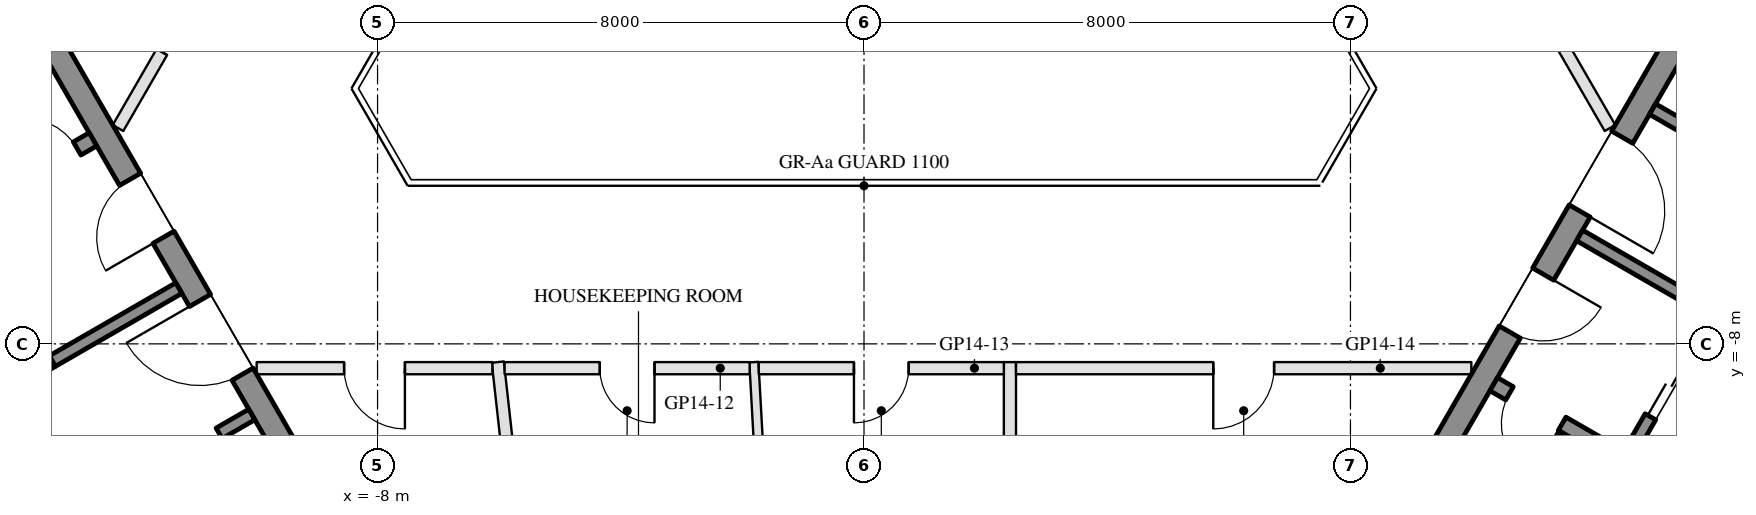
"""IFC4 building model, lengths in metres.
Left out: names, types, materials, properties, quantities, classifications, styles, units other than length and angle.
Written with IfcOpenShell. Run it as: python <this file> out.ifc"""

import sys

from ifc_helpers import new_model, si_unit, direction, frame, frame_2d, origin, place, context, subcontext, project, spatial, rectangle, extrude, element, fill, save


model = new_model("IFC4")
c1 = context("Model", 3, precision=1e-05, world=origin(), true_north=direction((0.0, 1.0)))
c2 = subcontext(c1, "Body", "Model", "MODEL_VIEW")
j1 = project(units=[si_unit("LENGTHUNIT", "METRE"), si_unit("PLANEANGLEUNIT", "RADIAN")], contexts=[c1])
p1 = place(None, origin())
s1 = spatial("IfcSite", under=j1, at=p1, CompositionType="ELEMENT")
p2 = place(p1, origin())
s2 = spatial("IfcBuilding", under=s1, at=p2, CompositionType="ELEMENT")
p3 = place(p2, frame((0.0, 0.0, 161.4)))
s3 = spatial("IfcBuildingStorey", under=s2, at=p3, CompositionType="ELEMENT", Elevation=161.4)
p4 = place(p3, frame((-13.845, -2.22, 0.0), z_axis=(0.0, 0.0, 1.0), x_axis=(0.500004234368, -0.866022959057, 0.0)))
e1 = element("IfcWall", 1, at=p4, inside=s3, PredefinedType="SHEAR", context=c2, shape_type="SweptSolid", body=[
    extrude(rectangle(XDim=10.0, YDim=0.4, at=frame_2d((5.0, 0.0))), origin(), (0.0, 0.0, 1.0), 3.5),
])
p5 = place(p4, frame((3.55, 0.0, 0.0)))
e2 = element("IfcOpeningElement", 2, at=p5, cuts=e1, PredefinedType="OPENING", context=c2, shape_type="SweptSolid", body=[
    extrude(rectangle(XDim=1.1, YDim=2.1, at=frame_2d((0.55, 1.05))), frame((0.0, 0.21, 0.0), z_axis=(0.0, -1.0, 0.0), x_axis=(1.0, 0.0, 0.0)), (0.0, 0.0, 1.0), 0.42),
])
p6 = place(p4, frame((5.85, 0.0, 0.0)))
e3 = element("IfcOpeningElement", 3, at=p6, cuts=e1, PredefinedType="OPENING", context=c2, shape_type="SweptSolid", body=[
    extrude(rectangle(XDim=1.4, YDim=2.1, at=frame_2d((0.7, 1.05))), frame((0.0, 0.21, 0.0), z_axis=(0.0, -1.0, 0.0), x_axis=(1.0, 0.0, 0.0)), (0.0, 0.0, 1.0), 0.42),
])
p7 = place(p3, frame((-12.681, -4.636, 0.0), z_axis=(0.0, 0.0, 1.0), x_axis=(-0.866021702275, -0.500006411147, 0.0)))
e4 = element("IfcWall", 4, at=p7, inside=s3, PredefinedType="SHEAR", context=c2, shape_type="SweptSolid", body=[
    extrude(rectangle(XDim=6.45, YDim=0.25, at=frame_2d((3.225, 0.0))), origin(), (0.0, 0.0, 1.0), 3.5),
])
p8 = place(p7, frame((0.3, 0.0, 0.0)))
e5 = element("IfcOpeningElement", 5, at=p8, cuts=e4, PredefinedType="OPENING", context=c2, shape_type="SweptSolid", body=[
    extrude(rectangle(XDim=1.0, YDim=2.1, at=frame_2d((0.5, 1.05))), frame((0.0, 0.135, 0.0), z_axis=(0.0, -1.0, 0.0), x_axis=(1.0, 0.0, 0.0)), (0.0, 0.0, 1.0), 0.27),
])
p9 = place(p3, frame((-14.783, -5.995, 0.0), z_axis=(0.0, 0.0, 1.0), x_axis=(0.49994636267, -0.866056369097, 0.0)))
e6 = element("IfcWall", 6, at=p9, inside=s3, PredefinedType="SHEAR", context=c2, shape_type="SweptSolid", body=[
    extrude(rectangle(XDim=2.8, YDim=0.2, at=frame_2d((1.4, 0.0))), origin(), (0.0, 0.0, 1.0), 3.5),
])
p10 = place(p9, frame((0.7, 0.0, 0.0)))
e7 = element("IfcOpeningElement", 7, at=p10, cuts=e6, PredefinedType="OPENING", context=c2, shape_type="SweptSolid", body=[
    extrude(rectangle(XDim=1.2, YDim=2.1, at=frame_2d((0.6, 1.05))), frame((0.0, 0.11, 0.0), z_axis=(0.0, -1.0, 0.0), x_axis=(1.0, 0.0, 0.0)), (0.0, 0.0, 1.0), 0.22),
])
p11 = place(p3, frame((-11.268, -7.083, 0.0), z_axis=(0.0, 0.0, 1.0), x_axis=(-0.866050077142, -0.499957262057, 0.0)))
e8 = element("IfcWall", 8, at=p11, inside=s3, PredefinedType="SHEAR", context=c2, shape_type="SweptSolid", body=[
    extrude(rectangle(XDim=2.4, YDim=0.2, at=frame_2d((1.2, 0.0))), origin(), (0.0, 0.0, 1.0), 3.5),
])
p12 = place(p3, frame((-10.068, -9.162, 0.0), z_axis=(0.0, 0.0, 1.0), x_axis=(-0.866032725843, -0.499987317609, 0.0)))
e9 = element("IfcWall", 9, at=p12, inside=s3, PredefinedType="SHEAR", context=c2, shape_type="SweptSolid", body=[
    extrude(rectangle(XDim=10.16, YDim=0.2, at=frame_2d((5.08, 0.0))), origin(), (0.0, 0.0, 1.0), 3.5),
])
p13 = place(p12, frame((0.62, 0.0, 0.0)))
e10 = element("IfcOpeningElement", 10, at=p13, cuts=e9, PredefinedType="OPENING", context=c2, shape_type="SweptSolid", body=[
    extrude(rectangle(XDim=1.1, YDim=2.1, at=frame_2d((0.55, 1.05))), frame((0.0, 0.11, 0.0), z_axis=(0.0, -1.0, 0.0), x_axis=(1.0, 0.0, 0.0)), (0.0, 0.0, 1.0), 0.22),
])
p14 = place(p12, frame((3.16, 0.0, 0.0)))
e11 = element("IfcOpeningElement", 11, at=p14, cuts=e9, PredefinedType="OPENING", context=c2, shape_type="SweptSolid", body=[
    extrude(rectangle(XDim=1.1, YDim=2.1, at=frame_2d((0.55, 1.05))), frame((0.0, 0.11, 0.0), z_axis=(0.0, -1.0, 0.0), x_axis=(1.0, 0.0, 0.0)), (0.0, 0.0, 1.0), 0.22),
])
p15 = place(p12, frame((5.7, 0.0, 0.0)))
e12 = element("IfcOpeningElement", 12, at=p15, cuts=e9, PredefinedType="OPENING", context=c2, shape_type="SweptSolid", body=[
    extrude(rectangle(XDim=1.1, YDim=2.1, at=frame_2d((0.55, 1.05))), frame((0.0, 0.11, 0.0), z_axis=(0.0, -1.0, 0.0), x_axis=(1.0, 0.0, 0.0)), (0.0, 0.0, 1.0), 0.22),
])
p16 = place(p12, frame((8.24, 0.0, 0.0)))
e13 = element("IfcOpeningElement", 13, at=p16, cuts=e9, PredefinedType="OPENING", context=c2, shape_type="SweptSolid", body=[
    extrude(rectangle(XDim=1.1, YDim=2.1, at=frame_2d((0.55, 1.05))), frame((0.0, 0.11, 0.0), z_axis=(0.0, -1.0, 0.0), x_axis=(1.0, 0.0, 0.0)), (0.0, 0.0, 1.0), 0.22),
])
p17 = place(p3, frame((8.845, -10.88, 0.0), z_axis=(0.0, 0.0, 1.0), x_axis=(0.500004234368, 0.866022959057, 0.0)))
e14 = element("IfcWall", 14, at=p17, inside=s3, PredefinedType="SHEAR", context=c2, shape_type="SweptSolid", body=[
    extrude(rectangle(XDim=10.0, YDim=0.4, at=frame_2d((5.0, 0.0))), origin(), (0.0, 0.0, 1.0), 3.5),
])
p18 = place(p17, frame((3.55, 0.0, 0.0)))
e15 = element("IfcOpeningElement", 15, at=p18, cuts=e14, PredefinedType="OPENING", context=c2, shape_type="SweptSolid", body=[
    extrude(rectangle(XDim=1.1, YDim=2.1, at=frame_2d((0.55, 1.05))), frame((0.0, 0.21, 0.0), z_axis=(0.0, -1.0, 0.0), x_axis=(1.0, 0.0, 0.0)), (0.0, 0.0, 1.0), 0.42),
])
p19 = place(p17, frame((5.85, 0.0, 0.0)))
e16 = element("IfcOpeningElement", 16, at=p19, cuts=e14, PredefinedType="OPENING", context=c2, shape_type="SweptSolid", body=[
    extrude(rectangle(XDim=1.4, YDim=2.1, at=frame_2d((0.7, 1.05))), frame((0.0, 0.21, 0.0), z_axis=(0.0, -1.0, 0.0), x_axis=(1.0, 0.0, 0.0)), (0.0, 0.0, 1.0), 0.42),
])
p20 = place(p3, frame((10.356, -8.664, 0.0), z_axis=(0.0, 0.0, 1.0), x_axis=(0.866028629588, -0.499994412703, 0.0)))
e17 = element("IfcWall", 17, at=p20, inside=s3, PredefinedType="SHEAR", context=c2, shape_type="SweptSolid", body=[
    extrude(rectangle(XDim=6.45, YDim=0.25, at=frame_2d((3.225, 0.0))), origin(), (0.0, 0.0, 1.0), 3.5),
])
p21 = place(p20, frame((0.3, 0.0, 0.0)))
e18 = element("IfcOpeningElement", 18, at=p21, cuts=e17, PredefinedType="OPENING", context=c2, shape_type="SweptSolid", body=[
    extrude(rectangle(XDim=1.0, YDim=2.1, at=frame_2d((0.5, 1.05))), frame((0.0, 0.135, 0.0), z_axis=(0.0, -1.0, 0.0), x_axis=(1.0, 0.0, 0.0)), (0.0, 0.0, 1.0), 0.27),
])
p22 = place(p3, frame((12.583, -9.805, 0.0), z_axis=(0.0, 0.0, 1.0), x_axis=(0.49994636267, 0.866056369097, 0.0)))
e19 = element("IfcWall", 19, at=p22, inside=s3, PredefinedType="SHEAR", context=c2, shape_type="SweptSolid", body=[
    extrude(rectangle(XDim=2.8, YDim=0.2, at=frame_2d((1.4, 0.0))), origin(), (0.0, 0.0, 1.0), 3.5),
])
p23 = place(p22, frame((0.7, 0.0, 0.0)))
e20 = element("IfcOpeningElement", 20, at=p23, cuts=e19, PredefinedType="OPENING", context=c2, shape_type="SweptSolid", body=[
    extrude(rectangle(XDim=1.2, YDim=2.1, at=frame_2d((0.6, 1.05))), frame((0.0, 0.11, 0.0), z_axis=(0.0, -1.0, 0.0), x_axis=(1.0, 0.0, 0.0)), (0.0, 0.0, 1.0), 0.22),
])
p24 = place(p3, frame((11.768, -6.217, 0.0), z_axis=(0.0, 0.0, 1.0), x_axis=(0.866050077142, -0.499957262057, 0.0)))
e21 = element("IfcWall", 21, at=p24, inside=s3, PredefinedType="SHEAR", context=c2, shape_type="SweptSolid", body=[
    extrude(rectangle(XDim=2.4, YDim=0.2, at=frame_2d((1.2, 0.0))), origin(), (0.0, 0.0, 1.0), 3.5),
])
p25 = place(p3, frame((12.968, -4.138, 0.0), z_axis=(0.0, 0.0, 1.0), x_axis=(0.866028328073, -0.49999493495, 0.0)))
e22 = element("IfcWall", 22, at=p25, inside=s3, PredefinedType="SHEAR", context=c2, shape_type="SweptSolid", body=[
    extrude(rectangle(XDim=10.16, YDim=0.2, at=frame_2d((5.08, 0.0))), origin(), (0.0, 0.0, 1.0), 3.5),
])
p26 = place(p25, frame((0.72, 0.0, 0.0)))
e23 = element("IfcOpeningElement", 23, at=p26, cuts=e22, PredefinedType="OPENING", context=c2, shape_type="SweptSolid", body=[
    extrude(rectangle(XDim=0.9, YDim=2.1, at=frame_2d((0.45, 1.05))), frame((0.0, 0.11, 0.0), z_axis=(0.0, -1.0, 0.0), x_axis=(1.0, 0.0, 0.0)), (0.0, 0.0, 1.0), 0.22),
])
p27 = place(p25, frame((5.8, 0.0, 0.0)))
e24 = element("IfcOpeningElement", 24, at=p27, cuts=e22, PredefinedType="OPENING", context=c2, shape_type="SweptSolid", body=[
    extrude(rectangle(XDim=0.9, YDim=2.1, at=frame_2d((0.45, 1.05))), frame((0.0, 0.11, 0.0), z_axis=(0.0, -1.0, 0.0), x_axis=(1.0, 0.0, 0.0)), (0.0, 0.0, 1.0), 0.22),
])
p28 = place(p3, frame((-4.9, -18.38, 0.0), z_axis=(0.0, 0.0, 1.0), x_axis=(-0.110634961609, 0.993861109648, 0.0)))
e25 = element("IfcWall", 25, at=p28, inside=s3, PredefinedType="PARTITIONING", context=c2, shape_type="SweptSolid", body=[
    extrude(rectangle(XDim=10.142, YDim=0.2, at=frame_2d((5.071, 0.0))), origin(), (0.0, 0.0, 1.0), 3.06),
])
p29 = place(p3, frame((2.4, -19.28, 0.0), z_axis=(0.0, 0.0, 1.0), x_axis=(0.0, 1.0, 0.0)))
e26 = element("IfcWall", 26, at=p29, inside=s3, PredefinedType="PARTITIONING", context=c2, shape_type="SweptSolid", body=[
    extrude(rectangle(XDim=10.98, YDim=0.2, at=frame_2d((5.49, 0.0))), origin(), (0.0, 0.0, 1.0), 3.06),
])
p30 = place(p3, frame((-6.112, -8.4, 0.0), z_axis=(0.0, 0.0, 1.0), x_axis=(-1.0, 0.0, 0.0)))
e27 = element("IfcWall", 27, at=p30, inside=s3, PredefinedType="PARTITIONING", context=c2, shape_type="SweptSolid", body=[
    extrude(rectangle(XDim=3.876, YDim=0.2, at=frame_2d((1.938, 0.0))), origin(), (0.0, 0.0, 1.0), 2.95),
])
p31 = place(p30, frame((1.438, 0.0, 0.0)))
e28 = element("IfcOpeningElement", 28, at=p31, cuts=e27, PredefinedType="OPENING", context=c2, shape_type="SweptSolid", body=[
    extrude(rectangle(XDim=1.0, YDim=2.1, at=frame_2d((0.5, 1.05))), frame((0.0, 0.11, 0.0), z_axis=(0.0, -1.0, 0.0), x_axis=(1.0, 0.0, 0.0)), (0.0, 0.0, 1.0), 0.22),
])
p32 = place(p3, frame((-1.25, -18.38, 0.0), z_axis=(0.0, 0.0, 1.0), x_axis=(-0.055573151667, 0.998454618305, 0.0)))
e29 = element("IfcWall", 29, at=p32, inside=s3, PredefinedType="PARTITIONING", context=c2, shape_type="SweptSolid", body=[
    extrude(rectangle(XDim=10.095, YDim=0.15, at=frame_2d((5.048, 0.0))), origin(), (0.0, 0.0, 1.0), 3.06),
])
p33 = place(p3, frame((-1.881, -8.4, 0.0), z_axis=(0.0, 0.0, 1.0), x_axis=(-1.0, 0.0, 0.0)))
e30 = element("IfcWall", 30, at=p33, inside=s3, PredefinedType="PARTITIONING", context=c2, shape_type="SweptSolid", body=[
    extrude(rectangle(XDim=4.03, YDim=0.2, at=frame_2d((2.015, 0.0))), origin(), (0.0, 0.0, 1.0), 2.95),
])
p34 = place(p33, frame((1.565, 0.0, 0.0)))
e31 = element("IfcOpeningElement", 31, at=p34, cuts=e30, PredefinedType="OPENING", context=c2, shape_type="SweptSolid", body=[
    extrude(rectangle(XDim=0.9, YDim=2.1, at=frame_2d((0.45, 1.05))), frame((0.0, 0.11, 0.0), z_axis=(0.0, -1.0, 0.0), x_axis=(1.0, 0.0, 0.0)), (0.0, 0.0, 1.0), 0.22),
])
p35 = place(p3, frame((2.3, -8.4, 0.0), z_axis=(0.0, 0.0, 1.0), x_axis=(-1.0, 0.0, 0.0)))
e32 = element("IfcWall", 32, at=p35, inside=s3, PredefinedType="PARTITIONING", context=c2, shape_type="SweptSolid", body=[
    extrude(rectangle(XDim=4.031, YDim=0.2, at=frame_2d((2.015, 0.0))), origin(), (0.0, 0.0, 1.0), 2.95),
])
p36 = place(p35, frame((1.565, 0.0, 0.0)))
e33 = element("IfcOpeningElement", 33, at=p36, cuts=e32, PredefinedType="OPENING", context=c2, shape_type="SweptSolid", body=[
    extrude(rectangle(XDim=0.9, YDim=2.1, at=frame_2d((0.45, 1.05))), frame((0.0, 0.11, 0.0), z_axis=(0.0, -1.0, 0.0), x_axis=(1.0, 0.0, 0.0)), (0.0, 0.0, 1.0), 0.22),
])
p37 = place(p3, frame((9.988, -8.4, 0.0), z_axis=(0.0, 0.0, 1.0), x_axis=(-1.0, 0.0, 0.0)))
e34 = element("IfcWall", 34, at=p37, inside=s3, PredefinedType="PARTITIONING", context=c2, shape_type="SweptSolid", body=[
    extrude(rectangle(XDim=7.488, YDim=0.2, at=frame_2d((3.744, 0.0))), origin(), (0.0, 0.0, 1.0), 2.95),
])
p38 = place(p37, frame((3.244, 0.0, 0.0)))
e35 = element("IfcOpeningElement", 35, at=p38, cuts=e34, PredefinedType="OPENING", context=c2, shape_type="SweptSolid", body=[
    extrude(rectangle(XDim=1.0, YDim=2.1, at=frame_2d((0.5, 1.05))), frame((0.0, 0.11, 0.0), z_axis=(0.0, -1.0, 0.0), x_axis=(1.0, 0.0, 0.0)), (0.0, 0.0, 1.0), 0.22),
])
p39 = place(p3, frame((9.729, -0.051, 0.0), z_axis=(0.0, 0.0, 1.0), x_axis=(0.500005339912, -0.866022320763, 0.0)))
e36 = element("IfcWall", 36, at=p39, inside=s3, PredefinedType="PARTITIONING", context=c2, shape_type="SweptSolid", body=[
    extrude(rectangle(XDim=5.08, YDim=0.2, at=frame_2d((2.54, 0.0))), origin(), (0.0, 0.0, 1.0), 2.95),
])
p40 = place(p39, frame((2.04, 0.0, 0.0)))
e37 = element("IfcOpeningElement", 37, at=p40, cuts=e36, PredefinedType="OPENING", context=c2, shape_type="SweptSolid", body=[
    extrude(rectangle(XDim=1.0, YDim=2.1, at=frame_2d((0.5, 1.05))), frame((0.0, 0.11, 0.0), z_axis=(0.0, -1.0, 0.0), x_axis=(1.0, 0.0, 0.0)), (0.0, 0.0, 1.0), 0.22),
])
p41 = place(p3, frame((-12.269, -4.45, 0.0), z_axis=(0.0, 0.0, 1.0), x_axis=(0.500008716408, 0.866020371305, 0.0)))
e38 = element("IfcWall", 38, at=p41, inside=s3, PredefinedType="PARTITIONING", context=c2, shape_type="SweptSolid", body=[
    extrude(rectangle(XDim=3.888, YDim=0.2, at=frame_2d((1.944, 0.0))), origin(), (0.0, 0.0, 1.0), 2.95),
])
p42 = place(p41, frame((1.444, 0.0, 0.0)))
e39 = element("IfcOpeningElement", 39, at=p42, cuts=e38, PredefinedType="OPENING", context=c2, shape_type="SweptSolid", body=[
    extrude(rectangle(XDim=1.0, YDim=2.1, at=frame_2d((0.5, 1.05))), frame((0.0, 0.11, 0.0), z_axis=(0.0, -1.0, 0.0), x_axis=(1.0, 0.0, 0.0)), (0.0, 0.0, 1.0), 0.22),
])
p43 = place(p13, origin())
e40 = element("IfcDoor", 40, at=p43, inside=s3, OperationType="DOUBLE_DOOR_SLIDING", PredefinedType="DOOR", context=c2, shape_type="SweptSolid", body=[
    extrude(rectangle(XDim=1.1, YDim=2.1, at=frame_2d((0.55, 1.05))), frame((0.0, 0.025, 0.0), z_axis=(0.0, -1.0, 0.0), x_axis=(1.0, 0.0, 0.0)), (0.0, 0.0, 1.0), 0.05),
])
fill(e10, e40)
p44 = place(p5, frame((1.1, 0.0, 0.0), z_axis=(0.0, 0.0, 1.0), x_axis=(-1.0, 0.0, 0.0)))
e41 = element("IfcDoor", 41, at=p44, inside=s3, OperationType="SINGLE_SWING_LEFT", PredefinedType="DOOR", context=c2, shape_type="SweptSolid", body=[
    extrude(rectangle(XDim=1.1, YDim=2.1, at=frame_2d((0.55, 1.05))), frame((0.0, 0.025, 0.0), z_axis=(0.0, -1.0, 0.0), x_axis=(1.0, 0.0, 0.0)), (0.0, 0.0, 1.0), 0.05),
])
fill(e2, e41)
p45 = place(p6, frame((1.4, 0.0, 0.0), z_axis=(0.0, 0.0, 1.0), x_axis=(-1.0, 0.0, 0.0)))
e42 = element("IfcDoor", 42, at=p45, inside=s3, OperationType="DOUBLE_DOOR_SINGLE_SWING", PredefinedType="DOOR", context=c2, shape_type="SweptSolid", body=[
    extrude(rectangle(XDim=1.4, YDim=2.1, at=frame_2d((0.7, 1.05))), frame((0.0, 0.025, 0.0), z_axis=(0.0, -1.0, 0.0), x_axis=(1.0, 0.0, 0.0)), (0.0, 0.0, 1.0), 0.05),
])
fill(e3, e42)
p46 = place(p8, frame((1.0, 0.0, 0.0), z_axis=(0.0, 0.0, 1.0), x_axis=(-1.0, 0.0, 0.0)))
e43 = element("IfcDoor", 43, at=p46, inside=s3, OperationType="SINGLE_SWING_LEFT", PredefinedType="DOOR", context=c2, shape_type="SweptSolid", body=[
    extrude(rectangle(XDim=1.0, YDim=2.1, at=frame_2d((0.5, 1.05))), frame((0.0, 0.025, 0.0), z_axis=(0.0, -1.0, 0.0), x_axis=(1.0, 0.0, 0.0)), (0.0, 0.0, 1.0), 0.05),
])
fill(e5, e43)
p47 = place(p23, origin())
e44 = element("IfcDoor", 44, at=p47, inside=s3, OperationType="DOUBLE_DOOR_SLIDING", PredefinedType="DOOR", context=c2, shape_type="SweptSolid", body=[
    extrude(rectangle(XDim=1.2, YDim=2.1, at=frame_2d((0.6, 1.05))), frame((0.0, 0.025, 0.0), z_axis=(0.0, -1.0, 0.0), x_axis=(1.0, 0.0, 0.0)), (0.0, 0.0, 1.0), 0.05),
])
fill(e20, e44)
p48 = place(p18, frame((1.1, 0.0, 0.0), z_axis=(0.0, 0.0, 1.0), x_axis=(-1.0, 0.0, 0.0)))
e45 = element("IfcDoor", 45, at=p48, inside=s3, OperationType="SINGLE_SWING_LEFT", PredefinedType="DOOR", context=c2, shape_type="SweptSolid", body=[
    extrude(rectangle(XDim=1.1, YDim=2.1, at=frame_2d((0.55, 1.05))), frame((0.0, 0.025, 0.0), z_axis=(0.0, -1.0, 0.0), x_axis=(1.0, 0.0, 0.0)), (0.0, 0.0, 1.0), 0.05),
])
fill(e15, e45)
p49 = place(p19, frame((1.4, 0.0, 0.0), z_axis=(0.0, 0.0, 1.0), x_axis=(-1.0, 0.0, 0.0)))
e46 = element("IfcDoor", 46, at=p49, inside=s3, OperationType="DOUBLE_DOOR_SINGLE_SWING", PredefinedType="DOOR", context=c2, shape_type="SweptSolid", body=[
    extrude(rectangle(XDim=1.4, YDim=2.1, at=frame_2d((0.7, 1.05))), frame((0.0, 0.025, 0.0), z_axis=(0.0, -1.0, 0.0), x_axis=(1.0, 0.0, 0.0)), (0.0, 0.0, 1.0), 0.05),
])
fill(e16, e46)
p50 = place(p21, frame((1.0, 0.0, 0.0), z_axis=(0.0, 0.0, 1.0), x_axis=(-1.0, 0.0, 0.0)))
e47 = element("IfcDoor", 47, at=p50, inside=s3, OperationType="SINGLE_SWING_LEFT", PredefinedType="DOOR", context=c2, shape_type="SweptSolid", body=[
    extrude(rectangle(XDim=1.0, YDim=2.1, at=frame_2d((0.5, 1.05))), frame((0.0, 0.025, 0.0), z_axis=(0.0, -1.0, 0.0), x_axis=(1.0, 0.0, 0.0)), (0.0, 0.0, 1.0), 0.05),
])
fill(e18, e47)
p51 = place(p31, origin())
e48 = element("IfcDoor", 48, at=p51, inside=s3, OperationType="SINGLE_SWING_LEFT", PredefinedType="DOOR", context=c2, shape_type="SweptSolid", body=[
    extrude(rectangle(XDim=1.0, YDim=2.1, at=frame_2d((0.5, 1.05))), frame((0.0, 0.025, 0.0), z_axis=(0.0, -1.0, 0.0), x_axis=(1.0, 0.0, 0.0)), (0.0, 0.0, 1.0), 0.05),
])
fill(e28, e48)
p52 = place(p34, origin())
e49 = element("IfcDoor", 49, at=p52, inside=s3, OperationType="SINGLE_SWING_LEFT", PredefinedType="DOOR", context=c2, shape_type="SweptSolid", body=[
    extrude(rectangle(XDim=0.9, YDim=2.1, at=frame_2d((0.45, 1.05))), frame((0.0, 0.025, 0.0), z_axis=(0.0, -1.0, 0.0), x_axis=(1.0, 0.0, 0.0)), (0.0, 0.0, 1.0), 0.05),
])
fill(e31, e49)
p53 = place(p36, origin())
e50 = element("IfcDoor", 50, at=p53, inside=s3, OperationType="SINGLE_SWING_RIGHT", PredefinedType="DOOR", context=c2, shape_type="SweptSolid", body=[
    extrude(rectangle(XDim=0.9, YDim=2.1, at=frame_2d((0.45, 1.05))), frame((0.0, 0.025, 0.0), z_axis=(0.0, -1.0, 0.0), x_axis=(1.0, 0.0, 0.0)), (0.0, 0.0, 1.0), 0.05),
])
fill(e33, e50)
p54 = place(p38, origin())
e51 = element("IfcDoor", 51, at=p54, inside=s3, OperationType="SINGLE_SWING_RIGHT", PredefinedType="DOOR", context=c2, shape_type="SweptSolid", body=[
    extrude(rectangle(XDim=1.0, YDim=2.1, at=frame_2d((0.5, 1.05))), frame((0.0, 0.025, 0.0), z_axis=(0.0, -1.0, 0.0), x_axis=(1.0, 0.0, 0.0)), (0.0, 0.0, 1.0), 0.05),
])
fill(e35, e51)
p55 = place(p42, origin())
e52 = element("IfcDoor", 52, at=p55, inside=s3, OperationType="SINGLE_SWING_RIGHT", PredefinedType="DOOR", context=c2, shape_type="SweptSolid", body=[
    extrude(rectangle(XDim=1.0, YDim=2.1, at=frame_2d((0.5, 1.05))), frame((0.0, 0.025, 0.0), z_axis=(0.0, -1.0, 0.0), x_axis=(1.0, 0.0, 0.0)), (0.0, 0.0, 1.0), 0.05),
])
fill(e39, e52)
save(model, sys.argv[1])
